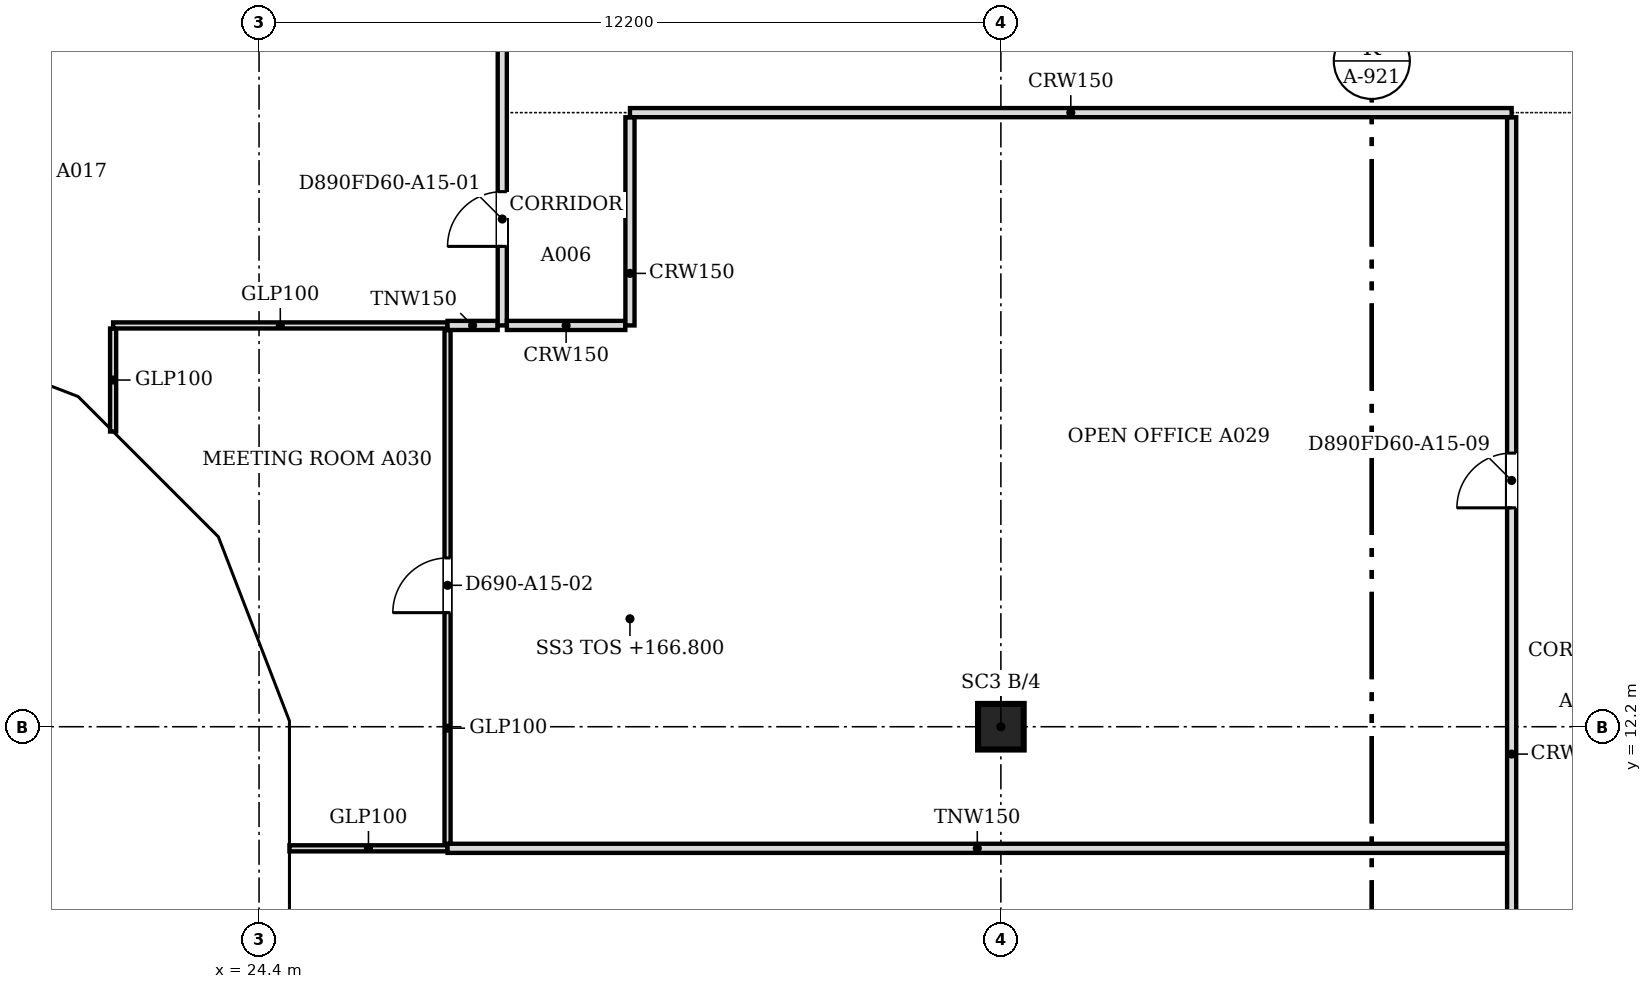
"""IFC4 building model, lengths in metres.
Left out: names, types, materials, properties, quantities, classifications, styles, units other than length and angle.
Written with IfcOpenShell. Run it as: python <this file> out.ifc"""

import sys

from ifc_helpers import new_model, si_unit, direction, frame, frame_2d, origin, origin_2d, place, context, subcontext, project, spatial, polyline, rectangle, outline, extrude, faceted_brep, source, transform, mapped, element, fill, save


model = new_model("IFC4")
c1 = context("Model", 3, precision=1e-05, world=origin(), true_north=direction((0.0, 1.0)))
c2 = subcontext(c1, "Body", "Model", "MODEL_VIEW")
j1 = project(units=[si_unit("LENGTHUNIT", "METRE"), si_unit("PLANEANGLEUNIT", "RADIAN")], contexts=[c1])
p1 = place(None, origin())
s1 = spatial("IfcSite", under=j1, at=p1, CompositionType="ELEMENT")
p2 = place(p1, origin())
s2 = spatial("IfcBuilding", under=s1, at=p2, CompositionType="ELEMENT")
p3 = place(p2, frame((0.0, 0.0, 166.8)))
s3 = spatial("IfcBuildingStorey", under=s2, at=p3, CompositionType="ELEMENT", Elevation=166.8)
p4 = place(p3, frame((36.6, 12.2, 0.0), z_axis=(0.0, 0.0, 1.0), x_axis=(1.0, 0.0, 0.0)))
e1 = element("IfcColumn", 1, at=p4, inside=s3, PredefinedType="COLUMN", context=c2, shape_type="SweptSolid", body=[
    extrude(rectangle(XDim=0.75, YDim=0.75, at=origin_2d()), origin(), (0.0, 0.0, 1.0), 3.6),
])
m1 = source(origin(), c2, "Body", "Brep", [
    faceted_brep([(3.096, -0.25, 7.536), (0.047, -0.25, 3.856), (0.047, -0.25, 3.744), (3.096, -0.25, 0.064), (0.0, 0.25, 3.8), (3.149, 0.25, 7.6), (3.202, 0.25, 7.536), (3.202, 0.25, 0.064), (3.149, 0.25, 0.0), (3.149, -0.0, 0.0), (3.149, -0.0, 7.6), (0.0, 0.0, 3.8)], [[[0, 1, 2, 3]], [[4, 5, 6, 7, 8]], [[8, 7, 9]], [[6, 5, 10]], [[5, 4, 11, 1, 0, 10]], [[4, 8, 9, 3, 2, 11]], [[11, 2, 1]], [[3, 9, 7, 6, 10, 0]]]),
])
p5 = place(p3, frame((18.346, 18.55, -3.8), z_axis=(0.0, 0.0, 1.0), x_axis=(0.932985567668, -0.359913782069, 0.0)))
e2 = element("IfcWall", 2, at=p5, inside=s3, PredefinedType="SOLIDWALL", context=c2, shape_type="MappedRepresentation", body=[
    mapped(m1, transform((0.0, 0.0, 0.0), scale=1.0)),
])
m2 = source(origin(), c2, "Body", "SweptSolid", [
    extrude(outline(polyline([(2.949, 6.967), (0.325, 3.8), (2.949, 0.633), (2.949, 6.967)])), frame((0.0, 0.26, 0.0), z_axis=(0.0, -1.0, 0.0), x_axis=(1.0, 0.0, 0.0)), (0.0, 0.0, 1.0), 0.52),
])
p6 = place(p5, origin())
e3 = element("IfcOpeningElement", 3, at=p6, cuts=e2, PredefinedType="OPENING", context=c2, shape_type="MappedRepresentation", body=[
    mapped(m2, transform((0.0, 0.0, 0.0), scale=1.0)),
])
m3 = source(origin(), c2, "Body", "Brep", [
    faceted_brep([(0.106, -0.25, 0.064), (3.156, -0.25, 3.736), (3.156, -0.25, 3.864), (0.106, -0.25, 7.536), (0.0, 0.25, 7.536), (0.053, 0.25, 7.6), (3.209, 0.25, 3.8), (0.053, 0.25, 0.0), (0.0, 0.25, 0.064), (3.209, -0.0, 3.8), (0.053, 0.0, 0.0), (0.053, 0.0, 7.6)], [[[0, 1, 2, 3]], [[4, 5, 6, 7, 8]], [[7, 6, 9, 1, 0, 10]], [[6, 5, 11, 3, 2, 9]], [[5, 4, 11]], [[8, 7, 10]], [[8, 10, 0, 3, 11, 4]], [[1, 9, 2]]]),
])
p7 = place(p3, frame((21.248, 17.454, -3.8), z_axis=(0.0, 0.0, 1.0), x_axis=(0.707106781187, -0.707106781187, 0.0)))
e4 = element("IfcWall", 4, at=p7, inside=s3, PredefinedType="SOLIDWALL", context=c2, shape_type="MappedRepresentation", body=[
    mapped(m3, transform((0.0, 0.0, 0.0), scale=1.0)),
])
m4 = source(origin(), c2, "Body", "SweptSolid", [
    extrude(outline(polyline([(0.253, 0.632), (2.884, 3.8), (0.253, 6.968), (0.253, 0.632)])), frame((0.0, 0.26, 0.0), z_axis=(0.0, -1.0, 0.0), x_axis=(1.0, 0.0, 0.0)), (0.0, 0.0, 1.0), 0.52),
])
p8 = place(p7, origin())
e5 = element("IfcOpeningElement", 5, at=p8, cuts=e4, PredefinedType="OPENING", context=c2, shape_type="MappedRepresentation", body=[
    mapped(m4, transform((0.0, 0.0, 0.0), scale=1.0)),
])
m5 = source(origin(), c2, "Body", "Brep", [
    faceted_brep([(3.103, -0.25, 7.544), (0.053, -0.25, 3.864), (0.053, -0.25, 3.736), (3.103, -0.25, 0.056), (0.0, 0.25, 3.8), (3.149, 0.25, 7.6), (3.196, 0.25, 7.543), (3.196, 0.25, 0.057), (3.149, 0.25, 0.0), (3.149, -0.0, 0.0), (3.149, -0.0, 7.6), (0.0, 0.0, 3.8)], [[[0, 1, 2, 3]], [[4, 5, 6, 7, 8]], [[8, 7, 9]], [[6, 5, 10]], [[5, 4, 11, 1, 0, 10]], [[4, 8, 9, 3, 2, 11]], [[11, 2, 1]], [[3, 9, 7, 6, 10, 0]]]),
])
p9 = place(p3, frame((23.517, 15.185, -3.8), z_axis=(0.0, 0.0, 1.0), x_axis=(0.359864468756, -0.933004589553, 0.0)))
e6 = element("IfcWall", 6, at=p9, inside=s3, PredefinedType="SOLIDWALL", context=c2, shape_type="MappedRepresentation", body=[
    mapped(m5, transform((0.0, 0.0, 0.0), scale=1.0)),
])
p10 = place(p9, origin())
e7 = element("IfcOpeningElement", 7, at=p10, cuts=e6, PredefinedType="OPENING", context=c2, shape_type="MappedRepresentation", body=[
    mapped(m2, transform((0.0, 0.0, 0.0), scale=1.0)),
])
m6 = source(origin(), c2, "Body", "Brep", [
    faceted_brep([(0.093, -0.25, 0.057), (3.143, -0.25, 3.8), (0.093, -0.25, 7.543), (0.0, 0.25, 7.544), (0.047, 0.25, 7.6), (3.143, 0.25, 3.8), (0.047, 0.25, 0.0), (0.0, 0.25, 0.056), (0.047, 0.0, 0.0), (0.047, 0.0, 7.6)], [[[0, 1, 2]], [[3, 4, 5, 6, 7]], [[6, 5, 1, 0, 8]], [[5, 4, 9, 2, 1]], [[4, 3, 9]], [[7, 6, 8]], [[7, 8, 0, 2, 9, 3]]]),
])
p11 = place(p3, frame((24.65, 12.293, -3.8), z_axis=(0.0, 0.0, 1.0), x_axis=(0.0, -1.0, 0.0)))
e8 = element("IfcWall", 8, at=p11, inside=s3, PredefinedType="SOLIDWALL", context=c2, shape_type="MappedRepresentation", body=[
    mapped(m6, transform((0.0, 0.0, 0.0), scale=1.0)),
])
m7 = source(origin(), c2, "Body", "SweptSolid", [
    extrude(outline(polyline([(0.247, 0.641), (2.821, 3.8), (0.247, 6.959), (0.247, 0.641)])), frame((0.0, 0.26, 0.0), z_axis=(0.0, -1.0, 0.0), x_axis=(1.0, 0.0, 0.0)), (0.0, 0.0, 1.0), 0.52),
])
p12 = place(p11, origin())
e9 = element("IfcOpeningElement", 9, at=p12, cuts=e8, PredefinedType="OPENING", context=c2, shape_type="MappedRepresentation", body=[
    mapped(m7, transform((0.0, 0.0, 0.0), scale=1.0)),
])
p13 = place(p2, frame((0.0, 0.0, 170.6)))
s4 = spatial("IfcBuildingStorey", under=s2, at=p13, CompositionType="ELEMENT", Elevation=170.6)
m8 = source(origin(), c2, "Body", "Brep", [
    faceted_brep([(0.093, -0.25, 0.056), (3.143, -0.25, 3.736), (3.143, -0.25, 3.864), (0.093, -0.25, 7.544), (0.0, 0.25, 7.543), (0.047, 0.25, 7.6), (3.196, 0.25, 3.8), (0.047, 0.25, 0.0), (0.0, 0.25, 0.057), (3.196, -0.0, 3.8), (0.047, 0.0, 0.0), (0.047, 0.0, 7.6)], [[[0, 1, 2, 3]], [[4, 5, 6, 7, 8]], [[7, 6, 9, 1, 0, 10]], [[6, 5, 11, 3, 2, 9]], [[5, 4, 11]], [[8, 7, 10]], [[8, 10, 0, 3, 11, 4]], [[1, 9, 2]]]),
])
p14 = place(p13, frame((18.303, 18.567, -3.8), z_axis=(0.0, 0.0, 1.0), x_axis=(0.932978940178, -0.359930961693, 0.0)))
e10 = element("IfcWall", 10, at=p14, inside=s4, PredefinedType="SOLIDWALL", context=c2, shape_type="MappedRepresentation", body=[
    mapped(m8, transform((0.0, 0.0, 0.0), scale=1.0)),
])
m9 = source(origin(), c2, "Body", "SweptSolid", [
    extrude(outline(polyline([(0.247, 0.633), (2.871, 3.8), (0.247, 6.967), (0.247, 0.633)])), frame((0.0, 0.26, 0.0), z_axis=(0.0, -1.0, 0.0), x_axis=(1.0, 0.0, 0.0)), (0.0, 0.0, 1.0), 0.52),
])
p15 = place(p14, origin())
e11 = element("IfcOpeningElement", 11, at=p15, cuts=e10, PredefinedType="OPENING", context=c2, shape_type="MappedRepresentation", body=[
    mapped(m9, transform((0.0, 0.0, 0.0), scale=1.0)),
])
m10 = source(origin(), c2, "Body", "Brep", [
    faceted_brep([(3.103, -0.25, 7.536), (0.053, -0.25, 3.864), (0.053, -0.25, 3.736), (3.103, -0.25, 0.064), (0.0, 0.25, 3.8), (3.156, 0.25, 7.6), (3.209, 0.25, 7.536), (3.209, 0.25, 0.064), (3.156, 0.25, 0.0), (3.156, -0.0, 0.0), (3.156, -0.0, 7.6), (0.0, 0.0, 3.8)], [[[0, 1, 2, 3]], [[4, 5, 6, 7, 8]], [[8, 7, 9]], [[6, 5, 10]], [[5, 4, 11, 1, 0, 10]], [[4, 8, 9, 3, 2, 11]], [[2, 1, 11]], [[3, 9, 7, 6, 10, 0]]]),
])
p16 = place(p13, frame((21.285, 17.417, -3.8), z_axis=(0.0, 0.0, 1.0), x_axis=(0.707106781187, -0.707106781187, 0.0)))
e12 = element("IfcWall", 12, at=p16, inside=s4, PredefinedType="SOLIDWALL", context=c2, shape_type="MappedRepresentation", body=[
    mapped(m10, transform((0.0, 0.0, 0.0), scale=1.0)),
])
m11 = source(origin(), c2, "Body", "SweptSolid", [
    extrude(outline(polyline([(2.956, 6.968), (0.325, 3.8), (2.956, 0.632), (2.956, 6.968)])), frame((0.0, 0.26, 0.0), z_axis=(0.0, -1.0, 0.0), x_axis=(1.0, 0.0, 0.0)), (0.0, 0.0, 1.0), 0.52),
])
p17 = place(p16, origin())
e13 = element("IfcOpeningElement", 13, at=p17, cuts=e12, PredefinedType="OPENING", context=c2, shape_type="MappedRepresentation", body=[
    mapped(m11, transform((0.0, 0.0, 0.0), scale=1.0)),
])
m12 = source(origin(), c2, "Body", "Brep", [
    faceted_brep([(0.106, -0.25, 0.064), (3.156, -0.25, 3.744), (3.156, -0.25, 3.856), (0.106, -0.25, 7.536), (0.0, 0.25, 7.536), (0.053, 0.25, 7.6), (3.202, 0.25, 3.8), (0.053, 0.25, 0.0), (0.0, 0.25, 0.064), (3.202, -0.0, 3.8), (0.053, 0.0, 0.0), (0.053, 0.0, 7.6)], [[[0, 1, 2, 3]], [[4, 5, 6, 7, 8]], [[7, 6, 9, 1, 0, 10]], [[6, 5, 11, 3, 2, 9]], [[5, 4, 11]], [[8, 7, 10]], [[8, 10, 0, 3, 11, 4]], [[1, 9, 2]]]),
])
p18 = place(p13, frame((23.497, 15.234, -3.8), z_axis=(0.0, 0.0, 1.0), x_axis=(0.359913782069, -0.932985567668, 0.0)))
e14 = element("IfcWall", 14, at=p18, inside=s4, PredefinedType="SOLIDWALL", context=c2, shape_type="MappedRepresentation", body=[
    mapped(m12, transform((0.0, 0.0, 0.0), scale=1.0)),
])
m13 = source(origin(), c2, "Body", "SweptSolid", [
    extrude(outline(polyline([(0.253, 0.633), (2.878, 3.8), (0.253, 6.967), (0.253, 0.633)])), frame((0.0, 0.26, 0.0), z_axis=(0.0, -1.0, 0.0), x_axis=(1.0, 0.0, 0.0)), (0.0, 0.0, 1.0), 0.52),
])
p19 = place(p18, origin())
e15 = element("IfcOpeningElement", 15, at=p19, cuts=e14, PredefinedType="OPENING", context=c2, shape_type="MappedRepresentation", body=[
    mapped(m13, transform((0.0, 0.0, 0.0), scale=1.0)),
])
m14 = source(origin(), c2, "Body", "Brep", [
    faceted_brep([(3.096, -0.25, 0.0), (6.1, -0.25, 3.8), (3.096, -0.25, 7.6), (0.047, -0.25, 3.857), (0.047, -0.25, 3.743), (0.0, 0.25, 3.8), (3.096, 0.25, 7.6), (6.053, 0.25, 3.859), (6.053, 0.25, 3.741), (3.096, 0.25, 0.0), (6.1, -0.0, 3.8), (0.0, 0.0, 3.8)], [[[0, 1, 2, 3, 4]], [[5, 6, 7, 8, 9]], [[9, 8, 10, 1, 0]], [[7, 6, 2, 1, 10]], [[6, 5, 11, 3, 2]], [[5, 9, 0, 4, 11]], [[4, 3, 11]], [[8, 7, 10]]]),
])
p20 = place(p13, frame((24.65, 12.247, -3.8), z_axis=(0.0, 0.0, 1.0), x_axis=(0.0, -1.0, 0.0)))
e16 = element("IfcWall", 16, at=p20, inside=s4, PredefinedType="SOLIDWALL", context=c2, shape_type="MappedRepresentation", body=[
    mapped(m14, transform((0.0, 0.0, 0.0), scale=1.0)),
])
m15 = source(origin(), c2, "Body", "SweptSolid", [
    extrude(outline(polyline([(3.094, 0.399), (5.781, 3.8), (3.094, 7.2), (0.323, 3.8), (3.094, 0.399)])), frame((0.0, 0.26, 0.0), z_axis=(0.0, -1.0, 0.0), x_axis=(1.0, 0.0, 0.0)), (0.0, 0.0, 1.0), 0.52),
])
p21 = place(p20, origin())
e17 = element("IfcOpeningElement", 17, at=p21, cuts=e16, PredefinedType="OPENING", context=c2, shape_type="MappedRepresentation", body=[
    mapped(m15, transform((0.0, 0.0, 0.0), scale=1.0)),
])
p22 = place(p3, frame((45.0, 0.5, 0.0), z_axis=(0.0, 0.0, 1.0), x_axis=(0.0, 1.0, 0.0)))
e18 = element("IfcWall", 18, at=p22, inside=s3, PredefinedType="PARTITIONING", context=c2, shape_type="SweptSolid", body=[
    extrude(rectangle(XDim=21.724, YDim=0.15, at=frame_2d((10.862, 0.0))), origin(), (0.0, 0.0, 1.0), 3.067),
])
m16 = source(origin(), c2, "Body", "SweptSolid", [
    extrude(rectangle(XDim=1.0, YDim=2.1, at=frame_2d((0.5, 1.05))), frame((0.0, 0.085, 0.0), z_axis=(0.0, -1.0, 0.0), x_axis=(1.0, 0.0, 0.0)), (0.0, 0.0, 1.0), 0.17),
])
p23 = place(p22, frame((6.2, 0.0, 0.0)))
e19 = element("IfcOpeningElement", 19, at=p23, cuts=e18, PredefinedType="OPENING", context=c2, shape_type="MappedRepresentation", body=[
    mapped(m16, transform((0.0, 0.0, 0.0), scale=1.0)),
])
m17 = source(origin(), c2, "Body", "SweptSolid", [
    extrude(rectangle(XDim=0.9, YDim=2.1, at=frame_2d((0.45, 1.05))), frame((0.0, 0.085, 0.0), z_axis=(0.0, -1.0, 0.0), x_axis=(1.0, 0.0, 0.0)), (0.0, 0.0, 1.0), 0.17),
])
p24 = place(p22, frame((15.3, 0.0, 0.0)))
e20 = element("IfcOpeningElement", 20, at=p24, cuts=e18, PredefinedType="OPENING", context=c2, shape_type="MappedRepresentation", body=[
    mapped(m17, transform((0.0, 0.0, 0.0), scale=1.0)),
])
p25 = place(p3, frame((24.9, 10.2, 0.0), z_axis=(0.0, 0.0, 1.0), x_axis=(1.0, 0.0, 0.0)))
e21 = element("IfcWall", 21, at=p25, inside=s3, PredefinedType="PARTITIONING", context=c2, shape_type="SweptSolid", body=[
    extrude(rectangle(XDim=2.599, YDim=0.1, at=frame_2d((1.3, 0.0))), origin(), (0.0, 0.0, 1.0), 3.067),
])
p26 = place(p3, frame((27.5, 10.2, 0.0), z_axis=(0.0, 0.0, 1.0), x_axis=(1.0, 0.0, 0.0)))
e22 = element("IfcWall", 22, at=p26, inside=s3, PredefinedType="PARTITIONING", context=c2, shape_type="SweptSolid", body=[
    extrude(rectangle(XDim=17.424, YDim=0.15, at=frame_2d((8.712, 0.0))), origin(), (0.0, 0.0, 1.0), 3.067),
])
p27 = place(p3, frame((27.5, 10.276, 0.0), z_axis=(0.0, 0.0, 1.0), x_axis=(0.0, 1.0, 0.0)))
e23 = element("IfcWall", 23, at=p27, inside=s3, PredefinedType="PARTITIONING", context=c2, shape_type="SweptSolid", body=[
    extrude(rectangle(XDim=8.448, YDim=0.1, at=frame_2d((4.224, 0.0))), origin(), (0.0, 0.0, 1.0), 3.067),
])
m18 = source(origin(), c2, "Body", "SweptSolid", [
    extrude(rectangle(XDim=0.9, YDim=2.1, at=frame_2d((0.45, 1.05))), frame((0.0, 0.06, 0.0), z_axis=(0.0, -1.0, 0.0), x_axis=(1.0, 0.0, 0.0)), (0.0, 0.0, 1.0), 0.12),
])
p28 = place(p27, frame((3.8, 0.0, 0.0)))
e24 = element("IfcOpeningElement", 24, at=p28, cuts=e23, PredefinedType="OPENING", context=c2, shape_type="MappedRepresentation", body=[
    mapped(m18, transform((0.0, 0.0, 0.0), scale=1.0)),
])
p29 = place(p3, frame((22.0, 17.055, 0.0), z_axis=(0.0, 0.0, 1.0), x_axis=(0.0, 1.0, 0.0)))
e25 = element("IfcWall", 25, at=p29, inside=s3, PredefinedType="PARTITIONING", context=c2, shape_type="SweptSolid", body=[
    extrude(rectangle(XDim=1.694, YDim=0.1, at=frame_2d((0.847, 0.0))), origin(), (0.0, 0.0, 1.0), 3.067),
])
p30 = place(p3, frame((22.0, 18.8, 0.0), z_axis=(0.0, 0.0, 1.0), x_axis=(1.0, 0.0, 0.0)))
e26 = element("IfcWall", 26, at=p30, inside=s3, PredefinedType="PARTITIONING", context=c2, shape_type="SweptSolid", body=[
    extrude(rectangle(XDim=5.499, YDim=0.1, at=frame_2d((2.75, 0.0))), origin(), (0.0, 0.0, 1.0), 3.067),
])
p31 = place(p3, frame((27.5, 18.8, 0.0), z_axis=(0.0, 0.0, 1.0), x_axis=(1.0, 0.0, 0.0)))
e27 = element("IfcWall", 27, at=p31, inside=s3, PredefinedType="PARTITIONING", context=c2, shape_type="SweptSolid", body=[
    extrude(rectangle(XDim=0.824, YDim=0.15, at=frame_2d((0.412, 0.0))), origin(), (0.0, 0.0, 1.0), 3.067),
])
p32 = place(p3, frame((28.4, 18.8, 0.0), z_axis=(0.0, 0.0, 1.0), x_axis=(0.0, 1.0, 0.0)))
e28 = element("IfcWall", 28, at=p32, inside=s3, PredefinedType="PARTITIONING", context=c2, shape_type="SweptSolid", body=[
    extrude(rectangle(XDim=26.824, YDim=0.15, at=frame_2d((13.412, 0.0))), origin(), (0.0, 0.0, 1.0), 3.067),
])
p33 = place(p32, frame((1.3, 0.0, 0.0)))
e29 = element("IfcOpeningElement", 29, at=p33, cuts=e28, PredefinedType="OPENING", context=c2, shape_type="MappedRepresentation", body=[
    mapped(m17, transform((0.0, 0.0, 0.0), scale=1.0)),
])
p34 = place(p32, frame((23.351, 0.0, 0.0)))
e30 = element("IfcOpeningElement", 30, at=p34, cuts=e28, PredefinedType="OPENING", context=c2, shape_type="MappedRepresentation", body=[
    mapped(m16, transform((0.0, 0.0, 0.0), scale=1.0)),
])
p35 = place(p32, frame((8.1, 0.0, 0.0)))
e31 = element("IfcOpeningElement", 31, at=p35, cuts=e28, PredefinedType="OPENING", context=c2, shape_type="MappedRepresentation", body=[
    mapped(m16, transform((0.0, 0.0, 0.0), scale=1.0)),
])
p36 = place(p32, frame((15.8, 0.0, 0.0)))
e32 = element("IfcOpeningElement", 32, at=p36, cuts=e28, PredefinedType="OPENING", context=c2, shape_type="MappedRepresentation", body=[
    mapped(m17, transform((0.0, 0.0, 0.0), scale=1.0)),
])
p37 = place(p3, frame((28.476, 18.8, 0.0), z_axis=(0.0, 0.0, 1.0), x_axis=(1.0, 0.0, 0.0)))
e33 = element("IfcWall", 33, at=p37, inside=s3, PredefinedType="PARTITIONING", context=c2, shape_type="SweptSolid", body=[
    extrude(rectangle(XDim=1.948, YDim=0.15, at=frame_2d((0.974, 0.0))), origin(), (0.0, 0.0, 1.0), 3.067),
])
p38 = place(p3, frame((30.5, 18.8, 0.0), z_axis=(0.0, 0.0, 1.0), x_axis=(0.0, 1.0, 0.0)))
e34 = element("IfcWall", 34, at=p38, inside=s3, PredefinedType="PARTITIONING", context=c2, shape_type="SweptSolid", body=[
    extrude(rectangle(XDim=3.424, YDim=0.15, at=frame_2d((1.712, 0.0))), origin(), (0.0, 0.0, 1.0), 3.067),
])
p39 = place(p3, frame((30.5, 22.3, 0.0), z_axis=(0.0, 0.0, 1.0), x_axis=(1.0, 0.0, 0.0)))
e35 = element("IfcWall", 35, at=p39, inside=s3, PredefinedType="PARTITIONING", context=c2, shape_type="SweptSolid", body=[
    extrude(rectangle(XDim=14.5, YDim=0.15, at=frame_2d((7.25, 0.0))), origin(), (0.0, 0.0, 1.0), 3.067),
])
m19 = source(origin(), c2, "Body", "SweptSolid", [
    extrude(rectangle(XDim=0.9, YDim=2.1, at=frame_2d((0.45, 1.05))), frame((0.0, 0.025, 0.0), z_axis=(0.0, -1.0, 0.0), x_axis=(1.0, 0.0, 0.0)), (0.0, 0.0, 1.0), 0.05),
])
p40 = place(p33, origin())
e36 = element("IfcDoor", 36, at=p40, inside=s3, OperationType="SINGLE_SWING_LEFT", PredefinedType="DOOR", context=c2, shape_type="MappedRepresentation", body=[
    mapped(m19, transform((0.0, 0.0, 0.0), scale=1.0)),
])
fill(e29, e36)
p41 = place(p28, origin())
e37 = element("IfcDoor", 37, at=p41, inside=s3, OperationType="SINGLE_SWING_LEFT", PredefinedType="DOOR", context=c2, shape_type="MappedRepresentation", body=[
    mapped(m19, transform((0.0, 0.0, 0.0), scale=1.0)),
])
fill(e24, e37)
p42 = place(p24, origin())
e38 = element("IfcDoor", 38, at=p42, inside=s3, OperationType="SINGLE_SWING_LEFT", PredefinedType="DOOR", context=c2, shape_type="MappedRepresentation", body=[
    mapped(m19, transform((0.0, 0.0, 0.0), scale=1.0)),
])
fill(e20, e38)
save(model, sys.argv[1])
